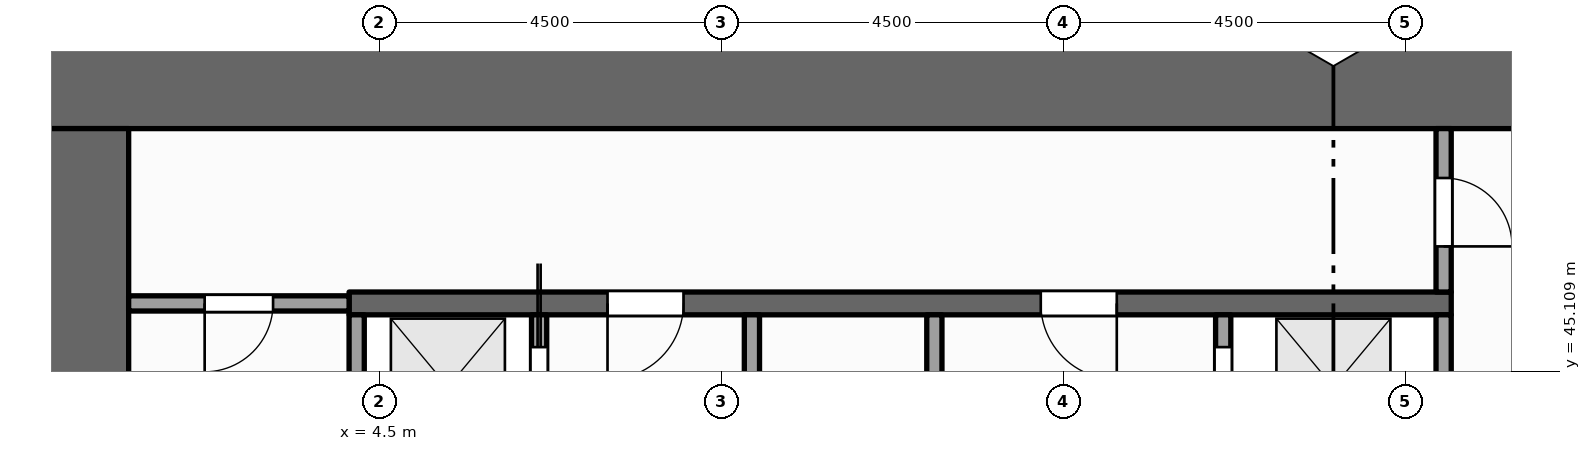
"""IFC4 building model, lengths in metres.
Left out: names, types, materials, properties, quantities, classifications, styles, units other than length and angle.
Written with IfcOpenShell. Run it as: python <this file> out.ifc"""

import sys

from ifc_helpers import new_model, si_unit, direction, frame, frame_2d, origin, place, context, subcontext, project, spatial, rectangle, extrude, element, fill, save


model = new_model("IFC4")
c1 = context("Model", 3, precision=1e-05, world=origin(), true_north=direction((0.0, 1.0)))
c2 = subcontext(c1, "Body", "Model", "MODEL_VIEW")
j1 = project(units=[si_unit("LENGTHUNIT", "METRE"), si_unit("PLANEANGLEUNIT", "RADIAN")], contexts=[c1])
p1 = place(None, origin())
s1 = spatial("IfcSite", under=j1, at=p1, CompositionType="ELEMENT")
p2 = place(p1, origin())
s2 = spatial("IfcBuilding", under=s1, at=p2, CompositionType="ELEMENT")
p3 = place(p2, frame((0.0, 0.0, 57.0)))
s3 = spatial("IfcBuildingStorey", under=s2, at=p3, CompositionType="ELEMENT", Elevation=57.0)
p4 = place(p3, frame((0.0, 48.9, -0.15), z_axis=(0.0, 0.0, 1.0), x_axis=(1.0, 0.0, 0.0)))
e1 = element("IfcWall", 1, at=p4, inside=s3, PredefinedType="SHEAR", context=c2, shape_type="SweptSolid", body=[
    extrude(rectangle(XDim=22.5, YDim=1.2, at=frame_2d((11.25, 0.0))), origin(), (0.0, 0.0, 1.0), 4.0),
])
p5 = place(p3, frame((0.6, 37.2, -0.15), z_axis=(0.0, 0.0, 1.0), x_axis=(0.0, 1.0, 0.0)))
e2 = element("IfcWall", 2, at=p5, inside=s3, PredefinedType="SHEAR", context=c2, shape_type="SweptSolid", body=[
    extrude(rectangle(XDim=11.1, YDim=1.2, at=frame_2d((5.55, 0.0))), origin(), (0.0, 0.0, 1.0), 4.0),
])
p6 = place(p3, frame((4.2, 43.525, 0.0), z_axis=(0.0, 0.0, 1.0), x_axis=(0.0, 1.0, 0.0)))
e3 = element("IfcWall", 3, at=p6, inside=s3, PredefinedType="SOLIDWALL", context=c2, shape_type="SweptSolid", body=[
    extrude(rectangle(XDim=2.325, YDim=0.2, at=frame_2d((1.163, 0.0))), origin(), (0.0, 0.0, 1.0), 3.85),
])
p7 = place(p3, frame((6.6, 37.2, 0.0), z_axis=(0.0, 0.0, 1.0), x_axis=(0.0, 1.0, 0.0)))
e4 = element("IfcWall", 4, at=p7, inside=s3, PredefinedType="SOLIDWALL", context=c2, shape_type="SweptSolid", body=[
    extrude(rectangle(XDim=8.65, YDim=0.2, at=frame_2d((4.325, 0.0))), origin(), (0.0, 0.0, 1.0), 3.85),
])
p8 = place(p7, frame((0.5, 0.0, 0.012)))
e5 = element("IfcOpeningElement", 5, at=p8, cuts=e4, PredefinedType="OPENING", context=c2, shape_type="SweptSolid", body=[
    extrude(rectangle(XDim=1.1, YDim=2.1, at=frame_2d((0.55, 1.05))), frame((0.0, 0.11, 0.0), z_axis=(0.0, -1.0, 0.0), x_axis=(1.0, 0.0, 0.0)), (0.0, 0.0, 1.0), 0.22),
])
p9 = place(p7, frame((2.75, 0.0, 0.012)))
e6 = element("IfcOpeningElement", 6, at=p9, cuts=e4, PredefinedType="OPENING", context=c2, shape_type="SweptSolid", body=[
    extrude(rectangle(XDim=1.1, YDim=2.1, at=frame_2d((0.55, 1.05))), frame((0.0, 0.11, 0.0), z_axis=(0.0, -1.0, 0.0), x_axis=(1.0, 0.0, 0.0)), (0.0, 0.0, 1.0), 0.22),
])
p10 = place(p7, frame((4.95, 0.0, 0.012)))
e7 = element("IfcOpeningElement", 7, at=p10, cuts=e4, PredefinedType="OPENING", context=c2, shape_type="SweptSolid", body=[
    extrude(rectangle(XDim=1.1, YDim=2.1, at=frame_2d((0.55, 1.05))), frame((0.0, 0.11, 0.0), z_axis=(0.0, -1.0, 0.0), x_axis=(1.0, 0.0, 0.0)), (0.0, 0.0, 1.0), 0.22),
])
p11 = place(p7, frame((7.125, 0.0, 0.012)))
e8 = element("IfcOpeningElement", 8, at=p11, cuts=e4, PredefinedType="OPENING", context=c2, shape_type="SweptSolid", body=[
    extrude(rectangle(XDim=1.1, YDim=2.1, at=frame_2d((0.55, 1.05))), frame((0.0, 0.11, 0.0), z_axis=(0.0, -1.0, 0.0), x_axis=(1.0, 0.0, 0.0)), (0.0, 0.0, 1.0), 0.22),
])
p12 = place(p3, frame((9.4, 37.2, 0.0), z_axis=(0.0, 0.0, 1.0), x_axis=(0.0, 1.0, 0.0)))
e9 = element("IfcWall", 9, at=p12, inside=s3, PredefinedType="PARTITIONING", context=c2, shape_type="SweptSolid", body=[
    extrude(rectangle(XDim=8.65, YDim=0.2, at=frame_2d((4.325, 0.0))), origin(), (0.0, 0.0, 1.0), 3.85),
])
p13 = place(p12, frame((3.875, 0.0, 0.0)))
e10 = element("IfcOpeningElement", 10, at=p13, cuts=e9, PredefinedType="OPENING", context=c2, shape_type="SweptSolid", body=[
    extrude(rectangle(XDim=0.9, YDim=2.1, at=frame_2d((0.45, 1.05))), frame((0.0, 0.11, 0.0), z_axis=(0.0, -1.0, 0.0), x_axis=(1.0, 0.0, 0.0)), (0.0, 0.0, 1.0), 0.22),
])
p14 = place(p3, frame((11.8, 37.2, 0.0), z_axis=(0.0, 0.0, 1.0), x_axis=(0.0, 1.0, 0.0)))
e11 = element("IfcWall", 11, at=p14, inside=s3, PredefinedType="PARTITIONING", context=c2, shape_type="SweptSolid", body=[
    extrude(rectangle(XDim=8.65, YDim=0.2, at=frame_2d((4.325, 0.0))), origin(), (0.0, 0.0, 1.0), 3.85),
])
p15 = place(p3, frame((15.6, 43.7, 0.0), z_axis=(0.0, 0.0, 1.0), x_axis=(0.0, 1.0, 0.0)))
e12 = element("IfcWall", 12, at=p15, inside=s3, PredefinedType="SOLIDWALL", context=c2, shape_type="SweptSolid", body=[
    extrude(rectangle(XDim=2.15, YDim=0.2, at=frame_2d((1.075, 0.0))), origin(), (0.0, 0.0, 1.0), 3.85),
])
p16 = place(p15, frame((0.625, 0.0, 0.012)))
e13 = element("IfcOpeningElement", 13, at=p16, cuts=e12, PredefinedType="OPENING", context=c2, shape_type="SweptSolid", body=[
    extrude(rectangle(XDim=1.1, YDim=2.1, at=frame_2d((0.55, 1.05))), frame((0.0, 0.11, 0.0), z_axis=(0.0, -1.0, 0.0), x_axis=(1.0, 0.0, 0.0)), (0.0, 0.0, 1.0), 0.22),
])
p17 = place(p3, frame((18.5, 43.7, 0.0), z_axis=(0.0, 0.0, 1.0), x_axis=(0.0, 1.0, 0.0)))
e14 = element("IfcWall", 14, at=p17, inside=s3, PredefinedType="SOLIDWALL", context=c2, shape_type="SweptSolid", body=[
    extrude(rectangle(XDim=2.15, YDim=0.2, at=frame_2d((1.075, 0.0))), origin(), (0.0, 0.0, 1.0), 3.85),
])
p18 = place(p3, frame((18.5, 46.15, 0.0), z_axis=(0.0, 0.0, 1.0), x_axis=(0.0, 1.0, 0.0)))
e15 = element("IfcWall", 15, at=p18, inside=s3, PredefinedType="PARTITIONING", context=c2, shape_type="SweptSolid", body=[
    extrude(rectangle(XDim=2.15, YDim=0.2, at=frame_2d((1.075, 0.0))), origin(), (0.0, 0.0, 1.0), 3.85),
])
p19 = place(p18, frame((0.6, 0.0, 0.0)))
e16 = element("IfcOpeningElement", 16, at=p19, cuts=e15, PredefinedType="OPENING", context=c2, shape_type="SweptSolid", body=[
    extrude(rectangle(XDim=0.9, YDim=2.1, at=frame_2d((0.45, 1.05))), frame((0.0, 0.11, 0.0), z_axis=(0.0, -1.0, 0.0), x_axis=(1.0, 0.0, 0.0)), (0.0, 0.0, 1.0), 0.22),
])
p20 = place(p3, frame((1.2, 46.0, 0.0), z_axis=(0.0, 0.0, 1.0), x_axis=(1.0, 0.0, 0.0)))
e17 = element("IfcWall", 17, at=p20, inside=s3, PredefinedType="PARTITIONING", context=c2, shape_type="SweptSolid", body=[
    extrude(rectangle(XDim=2.9, YDim=0.2, at=frame_2d((1.45, 0.0))), origin(), (0.0, 0.0, 1.0), 3.85),
])
p21 = place(p20, frame((1.0, 0.0, 0.0)))
e18 = element("IfcOpeningElement", 18, at=p21, cuts=e17, PredefinedType="OPENING", context=c2, shape_type="SweptSolid", body=[
    extrude(rectangle(XDim=0.9, YDim=2.1, at=frame_2d((0.45, 1.05))), frame((0.0, 0.11, 0.0), z_axis=(0.0, -1.0, 0.0), x_axis=(1.0, 0.0, 0.0)), (0.0, 0.0, 1.0), 0.22),
])
p22 = place(p3, frame((4.1, 46.0, 0.0), z_axis=(0.0, 0.0, 1.0), x_axis=(1.0, 0.0, 0.0)))
e19 = element("IfcWall", 19, at=p22, inside=s3, PredefinedType="SHEAR", context=c2, shape_type="SweptSolid", body=[
    extrude(rectangle(XDim=14.5, YDim=0.3, at=frame_2d((7.25, 0.0))), origin(), (0.0, 0.0, 1.0), 3.85),
])
p23 = place(p22, frame((3.4, 0.0, 0.0)))
e20 = element("IfcOpeningElement", 20, at=p23, cuts=e19, PredefinedType="OPENING", context=c2, shape_type="SweptSolid", body=[
    extrude(rectangle(XDim=1.0, YDim=2.1, at=frame_2d((0.5, 1.05))), frame((0.0, 0.16, 0.0), z_axis=(0.0, -1.0, 0.0), x_axis=(1.0, 0.0, 0.0)), (0.0, 0.0, 1.0), 0.32),
])
p24 = place(p22, frame((9.1, 0.0, 0.0)))
e21 = element("IfcOpeningElement", 21, at=p24, cuts=e19, PredefinedType="OPENING", context=c2, shape_type="SweptSolid", body=[
    extrude(rectangle(XDim=1.0, YDim=2.1, at=frame_2d((0.5, 1.05))), frame((0.0, 0.16, 0.0), z_axis=(0.0, -1.0, 0.0), x_axis=(1.0, 0.0, 0.0)), (0.0, 0.0, 1.0), 0.32),
])
p25 = place(p11, origin())
e22 = element("IfcDoor", 22, at=p25, inside=s3, OperationType="SLIDING_TO_RIGHT", PredefinedType="DOOR", context=c2, shape_type="SweptSolid", body=[
    extrude(rectangle(XDim=1.1, YDim=2.1, at=frame_2d((0.55, 1.05))), frame((0.0, 0.025, 0.0), z_axis=(0.0, -1.0, 0.0), x_axis=(1.0, 0.0, 0.0)), (0.0, 0.0, 1.0), 0.05),
])
fill(e8, e22)
p26 = place(p16, origin())
e23 = element("IfcDoor", 23, at=p26, inside=s3, OperationType="SLIDING_TO_LEFT", PredefinedType="DOOR", context=c2, shape_type="SweptSolid", body=[
    extrude(rectangle(XDim=1.1, YDim=2.1, at=frame_2d((0.55, 1.05))), frame((0.0, 0.025, 0.0), z_axis=(0.0, -1.0, 0.0), x_axis=(1.0, 0.0, 0.0)), (0.0, 0.0, 1.0), 0.05),
])
fill(e13, e23)
p27 = place(p23, origin())
e24 = element("IfcDoor", 24, at=p27, inside=s3, OperationType="SINGLE_SWING_LEFT", PredefinedType="DOOR", context=c2, shape_type="SweptSolid", body=[
    extrude(rectangle(XDim=1.0, YDim=2.1, at=frame_2d((0.5, 1.05))), frame((0.0, 0.025, 0.0), z_axis=(0.0, -1.0, 0.0), x_axis=(1.0, 0.0, 0.0)), (0.0, 0.0, 1.0), 0.05),
])
fill(e20, e24)
p28 = place(p24, origin())
e25 = element("IfcDoor", 25, at=p28, inside=s3, OperationType="SINGLE_SWING_RIGHT", PredefinedType="DOOR", context=c2, shape_type="SweptSolid", body=[
    extrude(rectangle(XDim=1.0, YDim=2.1, at=frame_2d((0.5, 1.05))), frame((0.0, 0.025, 0.0), z_axis=(0.0, -1.0, 0.0), x_axis=(1.0, 0.0, 0.0)), (0.0, 0.0, 1.0), 0.05),
])
fill(e21, e25)
p29 = place(p21, origin())
e26 = element("IfcDoor", 26, at=p29, inside=s3, OperationType="SINGLE_SWING_LEFT", PredefinedType="DOOR", context=c2, shape_type="SweptSolid", body=[
    extrude(rectangle(XDim=0.9, YDim=2.1, at=frame_2d((0.45, 1.05))), frame((0.0, 0.025, 0.0), z_axis=(0.0, -1.0, 0.0), x_axis=(1.0, 0.0, 0.0)), (0.0, 0.0, 1.0), 0.05),
])
fill(e18, e26)
p30 = place(p19, origin())
e27 = element("IfcDoor", 27, at=p30, inside=s3, OperationType="SINGLE_SWING_LEFT", PredefinedType="DOOR", context=c2, shape_type="SweptSolid", body=[
    extrude(rectangle(XDim=0.9, YDim=2.1, at=frame_2d((0.45, 1.05))), frame((0.0, 0.025, 0.0), z_axis=(0.0, -1.0, 0.0), x_axis=(1.0, 0.0, 0.0)), (0.0, 0.0, 1.0), 0.05),
])
fill(e16, e27)
save(model, sys.argv[1])
